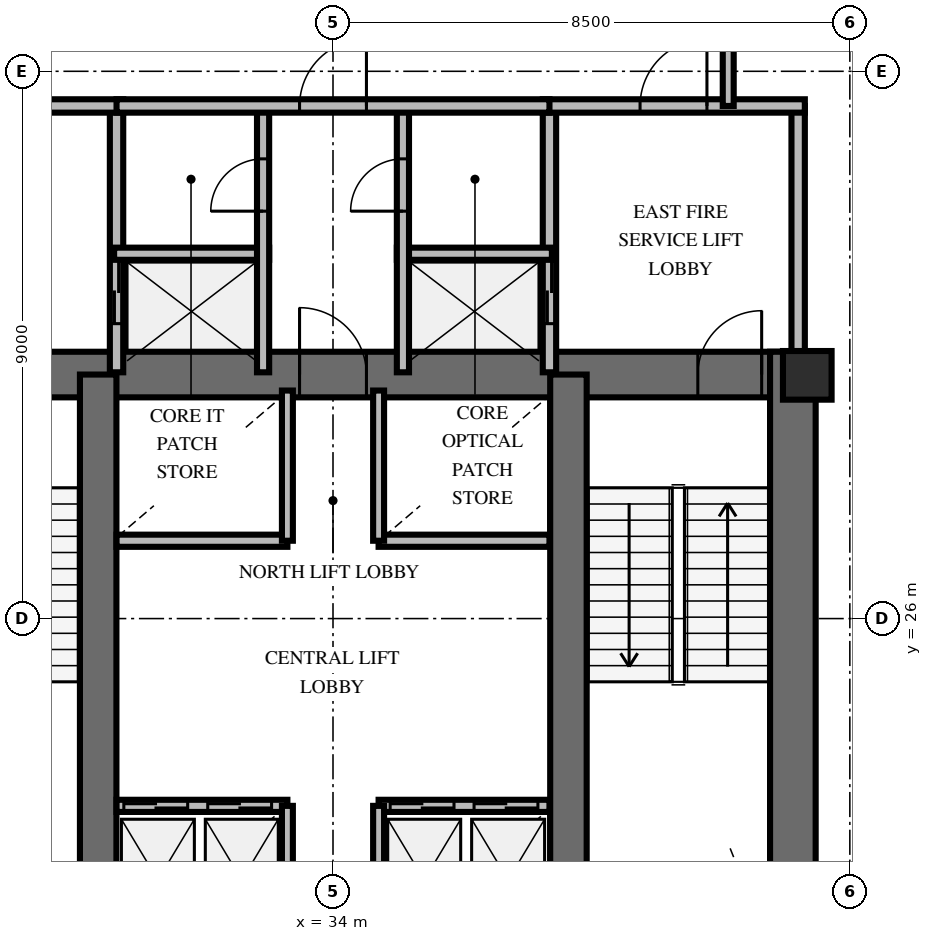
"""IFC4 building model, lengths in metres.
Left out: names, types, materials, properties, quantities, classifications, styles, units other than length and angle.
Written with IfcOpenShell. Run it as: python <this file> out.ifc"""

import sys

from ifc_helpers import new_model, si_unit, direction, frame, frame_2d, origin, origin_2d, place, context, subcontext, project, spatial, rectangle, extrude, element, fill, save


model = new_model("IFC4")
c1 = context("Model", 3, precision=1e-05, world=origin(), true_north=direction((0.0, 1.0)))
c2 = subcontext(c1, "Body", "Model", "MODEL_VIEW")
j1 = project(units=[si_unit("LENGTHUNIT", "METRE"), si_unit("PLANEANGLEUNIT", "RADIAN")], contexts=[c1])
p1 = place(None, origin())
s1 = spatial("IfcSite", under=j1, at=p1, CompositionType="ELEMENT")
p2 = place(p1, origin())
s2 = spatial("IfcBuilding", under=s1, at=p2, CompositionType="ELEMENT")
p3 = place(p2, frame((0.0, 0.0, 117.8)))
s3 = spatial("IfcBuildingStorey", under=s2, at=p3, CompositionType="ELEMENT", Elevation=117.8)
p4 = place(p3, frame((26.072, 30.013, 0.0), z_axis=(0.0, 0.0, 1.0), x_axis=(1.0, 0.0, 0.0)))
e1 = element("IfcWall", 1, at=p4, inside=s3, PredefinedType="SHEAR", context=c2, shape_type="SweptSolid", body=[
    extrude(rectangle(XDim=15.866, YDim=0.75, at=frame_2d((7.933, 0.0))), origin(), (0.0, 0.0, 1.0), 4.0),
])
p5 = place(p4, frame((0.878, 0.0, 0.0)))
e2 = element("IfcOpeningElement", 2, at=p5, cuts=e1, PredefinedType="OPENING", context=c2, shape_type="SweptSolid", body=[
    extrude(rectangle(XDim=1.05, YDim=2.15, at=frame_2d((0.525, 1.075))), frame((0.0, 0.385, 0.0), z_axis=(0.0, -1.0, 0.0), x_axis=(1.0, 0.0, 0.0)), (0.0, 0.0, 1.0), 0.77),
])
p6 = place(p4, frame((13.928, 0.0, 0.0)))
e3 = element("IfcOpeningElement", 3, at=p6, cuts=e1, PredefinedType="OPENING", context=c2, shape_type="SweptSolid", body=[
    extrude(rectangle(XDim=1.05, YDim=2.15, at=frame_2d((0.525, 1.075))), frame((0.0, 0.385, 0.0), z_axis=(0.0, -1.0, 0.0), x_axis=(1.0, 0.0, 0.0)), (0.0, 0.0, 1.0), 0.77),
])
p7 = place(p4, frame((7.378, 0.0, 0.0)))
e4 = element("IfcOpeningElement", 4, at=p7, cuts=e1, PredefinedType="OPENING", context=c2, shape_type="SweptSolid", body=[
    extrude(rectangle(XDim=1.1, YDim=2.15, at=frame_2d((0.55, 1.075))), frame((0.0, 0.385, 0.0), z_axis=(0.0, -1.0, 0.0), x_axis=(1.0, 0.0, 0.0)), (0.0, 0.0, 1.0), 0.77),
])
p8 = place(p3, frame((41.563, 19.812, 0.0), z_axis=(0.0, 0.0, 1.0), x_axis=(0.0, 1.0, 0.0)))
e5 = element("IfcWall", 5, at=p8, inside=s3, PredefinedType="SHEAR", context=c2, shape_type="SweptSolid", body=[
    extrude(rectangle(XDim=10.576, YDim=0.75, at=frame_2d((5.288, 0.0))), origin(), (0.0, 0.0, 1.0), 4.0),
])
for number, where, z_axis, x_axis in (
    (6, (30.138, 20.187, 0.0), (0.0, 0.0, 1.0), (0.0, 1.0, 0.0)),
    (7, (37.872, 20.187, 0.0), (0.0, 0.0, 1.0), (0.0, 1.0, 0.0)),
):
    element("IfcWall", number, at=place(p3, frame(where, z_axis=z_axis, x_axis=x_axis)), inside=s3, PredefinedType="SHEAR", context=c2, shape_type="SweptSolid", body=[
        extrude(rectangle(XDim=9.826, YDim=0.6, at=frame_2d((4.913, 0.0))), origin(), (0.0, 0.0, 1.0), 4.0),
    ])
p9 = place(p3, frame((41.8, 30.0, 0.0), z_axis=(0.0, 0.0, 1.0), x_axis=(1.0, 0.0, 0.0)))
e8 = element("IfcColumn", 8, at=p9, inside=s3, PredefinedType="PILASTER", context=c2, shape_type="SweptSolid", body=[
    extrude(rectangle(XDim=0.8, YDim=0.8, at=origin_2d()), origin(), (0.0, 0.0, 1.0), 4.0),
])
p10 = place(p3, frame((30.44, 30.05, 0.0), z_axis=(0.0, 0.0, 1.0), x_axis=(0.0, 1.0, 0.0)))
e9 = element("IfcWall", 9, at=p10, inside=s3, PredefinedType="SOLIDWALL", context=c2, shape_type="SweptSolid", body=[
    extrude(rectangle(XDim=4.38, YDim=0.22, at=frame_2d((2.19, 0.0))), origin(), (0.0, 0.0, 1.0), 2.8),
])
p11 = place(p10, frame((0.8, 0.0, 0.0)))
e10 = element("IfcOpeningElement", 10, at=p11, cuts=e9, PredefinedType="OPENING", context=c2, shape_type="SweptSolid", body=[
    extrude(rectangle(XDim=1.05, YDim=2.1, at=frame_2d((0.525, 1.05))), frame((0.0, 0.12, 0.0), z_axis=(0.0, -1.0, 0.0), x_axis=(1.0, 0.0, 0.0)), (0.0, 0.0, 1.0), 0.24),
])
p12 = place(p3, frame((26.24, 34.43, 0.0), z_axis=(0.0, 0.0, 1.0), x_axis=(1.0, 0.0, 0.0)))
e11 = element("IfcWall", 11, at=p12, inside=s3, PredefinedType="SOLIDWALL", context=c2, shape_type="SweptSolid", body=[
    extrude(rectangle(XDim=4.31, YDim=0.22, at=frame_2d((2.155, 0.0))), origin(), (0.0, 0.0, 1.0), 2.8),
])
p13 = place(p12, frame((1.6, 0.0, 0.0)))
e12 = element("IfcOpeningElement", 12, at=p13, cuts=e11, PredefinedType="OPENING", context=c2, shape_type="SweptSolid", body=[
    extrude(rectangle(XDim=1.1, YDim=2.15, at=frame_2d((0.55, 1.075))), frame((0.0, 0.12, 0.0), z_axis=(0.0, -1.0, 0.0), x_axis=(1.0, 0.0, 0.0)), (0.0, 0.0, 1.0), 0.24),
])
p14 = place(p3, frame((30.4, 32.0, 0.0), z_axis=(0.0, 0.0, 1.0), x_axis=(1.0, 0.0, 0.0)))
e13 = element("IfcWall", 13, at=p14, inside=s3, PredefinedType="SOLIDWALL", context=c2, shape_type="SweptSolid", body=[
    extrude(rectangle(XDim=2.55, YDim=0.2, at=frame_2d((1.275, 0.0))), origin(), (0.0, 0.0, 1.0), 2.8),
])
p15 = place(p3, frame((32.85, 30.05, 0.0), z_axis=(0.0, 0.0, 1.0), x_axis=(0.0, 1.0, 0.0)))
e14 = element("IfcWall", 14, at=p15, inside=s3, PredefinedType="SOLIDWALL", context=c2, shape_type="SweptSolid", body=[
    extrude(rectangle(XDim=4.38, YDim=0.2, at=frame_2d((2.19, 0.0))), origin(), (0.0, 0.0, 1.0), 2.8),
])
p16 = place(p15, frame((2.65, 0.0, 0.0)))
e15 = element("IfcOpeningElement", 15, at=p16, cuts=e14, PredefinedType="OPENING", context=c2, shape_type="SweptSolid", body=[
    extrude(rectangle(XDim=0.86, YDim=2.05, at=frame_2d((0.43, 1.025))), frame((0.0, 0.11, 0.0), z_axis=(0.0, -1.0, 0.0), x_axis=(1.0, 0.0, 0.0)), (0.0, 0.0, 1.0), 0.22),
])
p17 = place(p3, frame((37.56, 30.05, 0.0), z_axis=(0.0, 0.0, 1.0), x_axis=(0.0, 1.0, 0.0)))
e16 = element("IfcWall", 16, at=p17, inside=s3, PredefinedType="SOLIDWALL", context=c2, shape_type="SweptSolid", body=[
    extrude(rectangle(XDim=4.38, YDim=0.22, at=frame_2d((2.19, 0.0))), origin(), (0.0, 0.0, 1.0), 2.8),
])
p18 = place(p17, frame((0.8, 0.0, 0.0)))
e17 = element("IfcOpeningElement", 17, at=p18, cuts=e16, PredefinedType="OPENING", context=c2, shape_type="SweptSolid", body=[
    extrude(rectangle(XDim=1.05, YDim=2.1, at=frame_2d((0.525, 1.05))), frame((0.0, 0.12, 0.0), z_axis=(0.0, -1.0, 0.0), x_axis=(1.0, 0.0, 0.0)), (0.0, 0.0, 1.0), 0.24),
])
p19 = place(p3, frame((41.65, 30.05, 0.0), z_axis=(0.0, 0.0, 1.0), x_axis=(0.0, 1.0, 0.0)))
e18 = element("IfcWall", 18, at=p19, inside=s3, PredefinedType="SOLIDWALL", context=c2, shape_type="SweptSolid", body=[
    extrude(rectangle(XDim=4.38, YDim=0.22, at=frame_2d((2.19, 0.0))), origin(), (0.0, 0.0, 1.0), 2.8),
])
p20 = place(p3, frame((37.45, 34.43, 0.0), z_axis=(0.0, 0.0, 1.0), x_axis=(1.0, 0.0, 0.0)))
e19 = element("IfcWall", 19, at=p20, inside=s3, PredefinedType="SOLIDWALL", context=c2, shape_type="SweptSolid", body=[
    extrude(rectangle(XDim=4.31, YDim=0.22, at=frame_2d((2.155, 0.0))), origin(), (0.0, 0.0, 1.0), 2.8),
])
p21 = place(p20, frame((1.6, 0.0, 0.0)))
e20 = element("IfcOpeningElement", 20, at=p21, cuts=e19, PredefinedType="OPENING", context=c2, shape_type="SweptSolid", body=[
    extrude(rectangle(XDim=1.1, YDim=2.15, at=frame_2d((0.55, 1.075))), frame((0.0, 0.12, 0.0), z_axis=(0.0, -1.0, 0.0), x_axis=(1.0, 0.0, 0.0)), (0.0, 0.0, 1.0), 0.24),
])
p22 = place(p3, frame((35.05, 32.0, 0.0), z_axis=(0.0, 0.0, 1.0), x_axis=(1.0, 0.0, 0.0)))
e21 = element("IfcWall", 21, at=p22, inside=s3, PredefinedType="SOLIDWALL", context=c2, shape_type="SweptSolid", body=[
    extrude(rectangle(XDim=2.55, YDim=0.2, at=frame_2d((1.275, 0.0))), origin(), (0.0, 0.0, 1.0), 2.8),
])
p23 = place(p3, frame((35.15, 30.05, 0.0), z_axis=(0.0, 0.0, 1.0), x_axis=(0.0, 1.0, 0.0)))
e22 = element("IfcWall", 22, at=p23, inside=s3, PredefinedType="SOLIDWALL", context=c2, shape_type="SweptSolid", body=[
    extrude(rectangle(XDim=4.38, YDim=0.2, at=frame_2d((2.19, 0.0))), origin(), (0.0, 0.0, 1.0), 2.8),
])
p24 = place(p23, frame((2.65, 0.0, 0.0)))
e23 = element("IfcOpeningElement", 23, at=p24, cuts=e22, PredefinedType="OPENING", context=c2, shape_type="SweptSolid", body=[
    extrude(rectangle(XDim=0.86, YDim=2.05, at=frame_2d((0.43, 1.025))), frame((0.0, 0.11, 0.0), z_axis=(0.0, -1.0, 0.0), x_axis=(1.0, 0.0, 0.0)), (0.0, 0.0, 1.0), 0.22),
])
p25 = place(p3, frame((30.44, 34.43, 0.0), z_axis=(0.0, 0.0, 1.0), x_axis=(1.0, 0.0, 0.0)))
e24 = element("IfcWall", 24, at=p25, inside=s3, PredefinedType="SOLIDWALL", context=c2, shape_type="SweptSolid", body=[
    extrude(rectangle(XDim=7.12, YDim=0.22, at=frame_2d((3.56, 0.0))), origin(), (0.0, 0.0, 1.0), 2.8),
])
p26 = place(p25, frame((3.01, 0.0, 0.0)))
e25 = element("IfcOpeningElement", 25, at=p26, cuts=e24, PredefinedType="OPENING", context=c2, shape_type="SweptSolid", body=[
    extrude(rectangle(XDim=1.1, YDim=2.15, at=frame_2d((0.55, 1.075))), frame((0.0, 0.12, 0.0), z_axis=(0.0, -1.0, 0.0), x_axis=(1.0, 0.0, 0.0)), (0.0, 0.0, 1.0), 0.24),
])
p27 = place(p3, frame((30.44, 22.92, 0.0), z_axis=(0.0, 0.0, 1.0), x_axis=(1.0, 0.0, 0.0)))
e26 = element("IfcWall", 26, at=p27, inside=s3, PredefinedType="SOLIDWALL", context=c2, shape_type="SweptSolid", body=[
    extrude(rectangle(XDim=2.81, YDim=0.2, at=frame_2d((1.405, 0.0))), origin(), (0.0, 0.0, 1.0), 2.8),
])
p28 = place(p27, frame((0.12, 0.0, 0.0)))
e27 = element("IfcOpeningElement", 27, at=p28, cuts=e26, PredefinedType="OPENING", context=c2, shape_type="SweptSolid", body=[
    extrude(rectangle(XDim=1.05, YDim=2.1, at=frame_2d((0.525, 1.05))), frame((0.0, 0.11, 0.0), z_axis=(0.0, -1.0, 0.0), x_axis=(1.0, 0.0, 0.0)), (0.0, 0.0, 1.0), 0.22),
])
p29 = place(p27, frame((1.5, 0.0, 0.0)))
e28 = element("IfcOpeningElement", 28, at=p29, cuts=e26, PredefinedType="OPENING", context=c2, shape_type="SweptSolid", body=[
    extrude(rectangle(XDim=1.05, YDim=2.1, at=frame_2d((0.525, 1.05))), frame((0.0, 0.11, 0.0), z_axis=(0.0, -1.0, 0.0), x_axis=(1.0, 0.0, 0.0)), (0.0, 0.0, 1.0), 0.22),
])
p30 = place(p3, frame((33.25, 20.5, 0.0), z_axis=(0.0, 0.0, 1.0), x_axis=(0.0, 1.0, 0.0)))
e29 = element("IfcWall", 29, at=p30, inside=s3, PredefinedType="SOLIDWALL", context=c2, shape_type="SweptSolid", body=[
    extrude(rectangle(XDim=2.42, YDim=0.18, at=frame_2d((1.21, 0.0))), origin(), (0.0, 0.0, 1.0), 2.8),
])
p31 = place(p3, frame((34.75, 22.92, 0.0), z_axis=(0.0, 0.0, 1.0), x_axis=(1.0, 0.0, 0.0)))
e30 = element("IfcWall", 30, at=p31, inside=s3, PredefinedType="SOLIDWALL", context=c2, shape_type="SweptSolid", body=[
    extrude(rectangle(XDim=2.81, YDim=0.2, at=frame_2d((1.405, 0.0))), origin(), (0.0, 0.0, 1.0), 2.8),
])
p32 = place(p31, frame((0.19, 0.0, 0.0)))
e31 = element("IfcOpeningElement", 31, at=p32, cuts=e30, PredefinedType="OPENING", context=c2, shape_type="SweptSolid", body=[
    extrude(rectangle(XDim=1.05, YDim=2.1, at=frame_2d((0.525, 1.05))), frame((0.0, 0.11, 0.0), z_axis=(0.0, -1.0, 0.0), x_axis=(1.0, 0.0, 0.0)), (0.0, 0.0, 1.0), 0.22),
])
p33 = place(p31, frame((1.57, 0.0, 0.0)))
e32 = element("IfcOpeningElement", 32, at=p33, cuts=e30, PredefinedType="OPENING", context=c2, shape_type="SweptSolid", body=[
    extrude(rectangle(XDim=1.05, YDim=2.1, at=frame_2d((0.525, 1.05))), frame((0.0, 0.11, 0.0), z_axis=(0.0, -1.0, 0.0), x_axis=(1.0, 0.0, 0.0)), (0.0, 0.0, 1.0), 0.22),
])
p34 = place(p3, frame((34.75, 20.5, 0.0), z_axis=(0.0, 0.0, 1.0), x_axis=(0.0, 1.0, 0.0)))
e33 = element("IfcWall", 33, at=p34, inside=s3, PredefinedType="SOLIDWALL", context=c2, shape_type="SweptSolid", body=[
    extrude(rectangle(XDim=2.42, YDim=0.18, at=frame_2d((1.21, 0.0))), origin(), (0.0, 0.0, 1.0), 2.8),
])
p35 = place(p3, frame((30.44, 27.28, 0.0), z_axis=(0.0, 0.0, 1.0), x_axis=(1.0, 0.0, 0.0)))
e34 = element("IfcWall", 34, at=p35, inside=s3, PredefinedType="SOLIDWALL", context=c2, shape_type="SweptSolid", body=[
    extrude(rectangle(XDim=2.81, YDim=0.2, at=frame_2d((1.405, 0.0))), origin(), (0.0, 0.0, 1.0), 2.8),
])
p36 = place(p3, frame((33.25, 27.28, 0.0), z_axis=(0.0, 0.0, 1.0), x_axis=(0.0, 1.0, 0.0)))
e35 = element("IfcWall", 35, at=p36, inside=s3, PredefinedType="SOLIDWALL", context=c2, shape_type="SweptSolid", body=[
    extrude(rectangle(XDim=2.47, YDim=0.18, at=frame_2d((1.235, 0.0))), origin(), (0.0, 0.0, 1.0), 2.8),
])
p37 = place(p3, frame((34.75, 27.28, 0.0), z_axis=(0.0, 0.0, 1.0), x_axis=(1.0, 0.0, 0.0)))
e36 = element("IfcWall", 36, at=p37, inside=s3, PredefinedType="SOLIDWALL", context=c2, shape_type="SweptSolid", body=[
    extrude(rectangle(XDim=2.81, YDim=0.2, at=frame_2d((1.405, 0.0))), origin(), (0.0, 0.0, 1.0), 2.8),
])
p38 = place(p3, frame((34.75, 27.28, 0.0), z_axis=(0.0, 0.0, 1.0), x_axis=(0.0, 1.0, 0.0)))
e37 = element("IfcWall", 37, at=p38, inside=s3, PredefinedType="SOLIDWALL", context=c2, shape_type="SweptSolid", body=[
    extrude(rectangle(XDim=2.47, YDim=0.18, at=frame_2d((1.235, 0.0))), origin(), (0.0, 0.0, 1.0), 2.8),
])
p39 = place(p3, frame((40.5, 36.123, 0.0), z_axis=(0.0, 0.0, 1.0), x_axis=(0.0, -1.0, 0.0)))
e38 = element("IfcWall", 38, at=p39, inside=s3, PredefinedType="PARTITIONING", context=c2, shape_type="SweptSolid", body=[
    extrude(rectangle(XDim=1.693, YDim=0.18, at=frame_2d((0.846, 0.0))), origin(), (0.0, 0.0, 1.0), 2.8),
])
p40 = place(p3, frame((44.671, 34.938, 0.0), z_axis=(0.0, 0.0, 1.0), x_axis=(-0.765474013993, 0.643466808702, 0.0)))
e39 = element("IfcWall", 39, at=p40, inside=s3, PredefinedType="PARTITIONING", context=c2, shape_type="SweptSolid", body=[
    extrude(rectangle(XDim=4.834, YDim=0.18, at=frame_2d((2.417, 0.0))), origin(), (0.0, 0.0, 1.0), 2.8),
])
p41 = place(p6, origin())
e40 = element("IfcDoor", 40, at=p41, inside=s3, OperationType="SINGLE_SWING_RIGHT", PredefinedType="DOOR", context=c2, shape_type="SweptSolid", body=[
    extrude(rectangle(XDim=1.05, YDim=2.15, at=frame_2d((0.525, 1.075))), frame((0.0, 0.025, 0.0), z_axis=(0.0, -1.0, 0.0), x_axis=(1.0, 0.0, 0.0)), (0.0, 0.0, 1.0), 0.05),
])
fill(e3, e40)
p42 = place(p7, origin())
e41 = element("IfcDoor", 41, at=p42, inside=s3, OperationType="SINGLE_SWING_LEFT", PredefinedType="DOOR", context=c2, shape_type="SweptSolid", body=[
    extrude(rectangle(XDim=1.1, YDim=2.15, at=frame_2d((0.55, 1.075))), frame((0.0, 0.025, 0.0), z_axis=(0.0, -1.0, 0.0), x_axis=(1.0, 0.0, 0.0)), (0.0, 0.0, 1.0), 0.05),
])
fill(e4, e41)
p43 = place(p11, origin())
e42 = element("IfcDoor", 42, at=p43, inside=s3, OperationType="DOUBLE_DOOR_SLIDING", PredefinedType="USERDEFINED", context=c2, shape_type="SweptSolid", body=[
    extrude(rectangle(XDim=1.05, YDim=2.1, at=frame_2d((0.525, 1.05))), frame((0.0, 0.025, 0.0), z_axis=(0.0, -1.0, 0.0), x_axis=(1.0, 0.0, 0.0)), (0.0, 0.0, 1.0), 0.05),
])
fill(e10, e42)
p44 = place(p16, origin())
e43 = element("IfcDoor", 43, at=p44, inside=s3, OperationType="SINGLE_SWING_LEFT", PredefinedType="TRAPDOOR", context=c2, shape_type="SweptSolid", body=[
    extrude(rectangle(XDim=0.86, YDim=2.05, at=frame_2d((0.43, 1.025))), frame((0.0, 0.025, 0.0), z_axis=(0.0, -1.0, 0.0), x_axis=(1.0, 0.0, 0.0)), (0.0, 0.0, 1.0), 0.05),
])
fill(e15, e43)
p45 = place(p21, origin())
e44 = element("IfcDoor", 44, at=p45, inside=s3, OperationType="SINGLE_SWING_RIGHT", PredefinedType="DOOR", context=c2, shape_type="SweptSolid", body=[
    extrude(rectangle(XDim=1.1, YDim=2.15, at=frame_2d((0.55, 1.075))), frame((0.0, 0.025, 0.0), z_axis=(0.0, -1.0, 0.0), x_axis=(1.0, 0.0, 0.0)), (0.0, 0.0, 1.0), 0.05),
])
fill(e20, e44)
p46 = place(p18, origin())
e45 = element("IfcDoor", 45, at=p46, inside=s3, OperationType="DOUBLE_DOOR_SLIDING", PredefinedType="USERDEFINED", context=c2, shape_type="SweptSolid", body=[
    extrude(rectangle(XDim=1.05, YDim=2.1, at=frame_2d((0.525, 1.05))), frame((0.0, 0.025, 0.0), z_axis=(0.0, -1.0, 0.0), x_axis=(1.0, 0.0, 0.0)), (0.0, 0.0, 1.0), 0.05),
])
fill(e17, e45)
p47 = place(p24, origin())
e46 = element("IfcDoor", 46, at=p47, inside=s3, OperationType="SINGLE_SWING_LEFT", PredefinedType="TRAPDOOR", context=c2, shape_type="SweptSolid", body=[
    extrude(rectangle(XDim=0.86, YDim=2.05, at=frame_2d((0.43, 1.025))), frame((0.0, 0.025, 0.0), z_axis=(0.0, -1.0, 0.0), x_axis=(1.0, 0.0, 0.0)), (0.0, 0.0, 1.0), 0.05),
])
fill(e23, e46)
p48 = place(p26, origin())
e47 = element("IfcDoor", 47, at=p48, inside=s3, OperationType="SINGLE_SWING_RIGHT", PredefinedType="DOOR", context=c2, shape_type="SweptSolid", body=[
    extrude(rectangle(XDim=1.1, YDim=2.15, at=frame_2d((0.55, 1.075))), frame((0.0, 0.025, 0.0), z_axis=(0.0, -1.0, 0.0), x_axis=(1.0, 0.0, 0.0)), (0.0, 0.0, 1.0), 0.05),
])
fill(e25, e47)
p49 = place(p28, origin())
e48 = element("IfcDoor", 48, at=p49, inside=s3, OperationType="DOUBLE_DOOR_SLIDING", PredefinedType="USERDEFINED", context=c2, shape_type="SweptSolid", body=[
    extrude(rectangle(XDim=1.05, YDim=2.1, at=frame_2d((0.525, 1.05))), frame((0.0, 0.025, 0.0), z_axis=(0.0, -1.0, 0.0), x_axis=(1.0, 0.0, 0.0)), (0.0, 0.0, 1.0), 0.05),
])
fill(e27, e48)
p50 = place(p29, origin())
e49 = element("IfcDoor", 49, at=p50, inside=s3, OperationType="DOUBLE_DOOR_SLIDING", PredefinedType="USERDEFINED", context=c2, shape_type="SweptSolid", body=[
    extrude(rectangle(XDim=1.05, YDim=2.1, at=frame_2d((0.525, 1.05))), frame((0.0, 0.025, 0.0), z_axis=(0.0, -1.0, 0.0), x_axis=(1.0, 0.0, 0.0)), (0.0, 0.0, 1.0), 0.05),
])
fill(e28, e49)
p51 = place(p32, origin())
e50 = element("IfcDoor", 50, at=p51, inside=s3, OperationType="DOUBLE_DOOR_SLIDING", PredefinedType="USERDEFINED", context=c2, shape_type="SweptSolid", body=[
    extrude(rectangle(XDim=1.05, YDim=2.1, at=frame_2d((0.525, 1.05))), frame((0.0, 0.025, 0.0), z_axis=(0.0, -1.0, 0.0), x_axis=(1.0, 0.0, 0.0)), (0.0, 0.0, 1.0), 0.05),
])
fill(e31, e50)
p52 = place(p33, origin())
e51 = element("IfcDoor", 51, at=p52, inside=s3, OperationType="DOUBLE_DOOR_SLIDING", PredefinedType="USERDEFINED", context=c2, shape_type="SweptSolid", body=[
    extrude(rectangle(XDim=1.05, YDim=2.1, at=frame_2d((0.525, 1.05))), frame((0.0, 0.025, 0.0), z_axis=(0.0, -1.0, 0.0), x_axis=(1.0, 0.0, 0.0)), (0.0, 0.0, 1.0), 0.05),
])
fill(e32, e51)
save(model, sys.argv[1])
